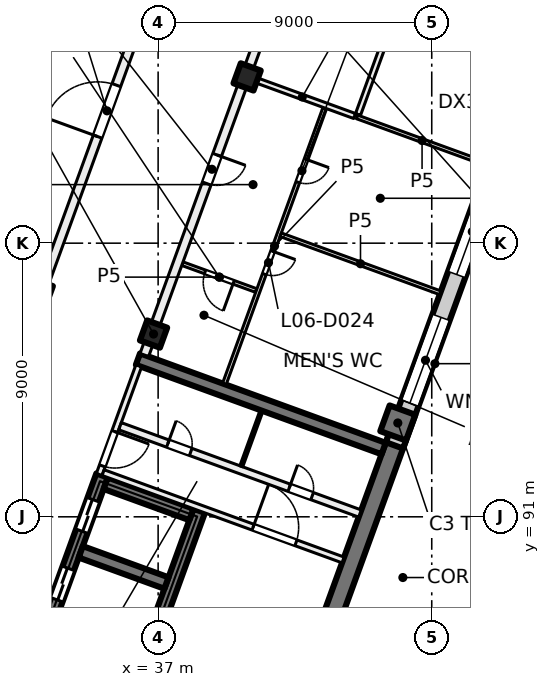
"""IFC4 building model, lengths in metres.
Left out: names, types, materials, properties, quantities, classifications, styles, units other than length and angle.
Written with IfcOpenShell. Run it as: python <this file> out.ifc"""

import sys

from ifc_helpers import new_model, si_unit, direction, frame, frame_2d, origin, origin_2d, place, context, subcontext, project, spatial, rectangle, extrude, element, fill, save


model = new_model("IFC4")
c1 = context("Model", 3, precision=1e-05, world=origin(), true_north=direction((0.0, 1.0)))
c2 = subcontext(c1, "Body", "Model", "MODEL_VIEW")
j1 = project(units=[si_unit("LENGTHUNIT", "METRE"), si_unit("PLANEANGLEUNIT", "RADIAN")], contexts=[c1])
p1 = place(None, origin())
s1 = spatial("IfcSite", under=j1, at=p1, CompositionType="ELEMENT")
p2 = place(p1, origin())
s2 = spatial("IfcBuilding", under=s1, at=p2, CompositionType="ELEMENT")
p3 = place(p2, frame((0.0, 0.0, 31.5)))
s3 = spatial("IfcBuildingStorey", under=s2, at=p3, CompositionType="ELEMENT", Elevation=31.5)
for number, where, z_axis, x_axis in (
    (1, (39.927, 105.468, 0.0), (0.0, 0.0, 1.0), (-0.342, -0.94, 0.0)),
    (2, (36.849, 97.011, 0.0), (0.0, 0.0, 1.0), (-0.342, -0.94, 0.0)),
    (3, (33.091, 98.379, 0.0), (0.0, 0.0, 1.0), (-0.342, -0.94, 0.0)),
):
    element("IfcColumn", number, at=place(p3, frame(where, z_axis=z_axis, x_axis=x_axis)), inside=s3, PredefinedType="COLUMN", context=c2, shape_type="SweptSolid", body=[
        extrude(rectangle(XDim=0.7, YDim=0.7, at=origin_2d()), origin(), (0.0, 0.0, 1.0), 4.0),
    ])
p4 = place(p3, frame((44.884, 94.087, 0.0), z_axis=(0.0, 0.0, 1.0), x_axis=(-0.342020143326, -0.939692620786, 0.0)))
e4 = element("IfcColumn", 4, at=p4, inside=s3, PredefinedType="COLUMN", context=c2, shape_type="SweptSolid", body=[
    extrude(rectangle(XDim=0.9, YDim=0.9, at=origin_2d()), origin(), (0.0, 0.0, 1.0), 4.0),
])
p5 = place(p3, frame((41.827, 85.249, 0.0), z_axis=(0.0, 0.0, 1.0), x_axis=(0.342016162452, 0.939694069696, 0.0)))
e5 = element("IfcWall", 5, at=p5, inside=s3, PredefinedType="SHEAR", context=c2, shape_type="SweptSolid", body=[
    extrude(rectangle(XDim=8.9, YDim=0.6, at=frame_2d((4.45, 0.0))), origin(), (0.0, 0.0, 1.0), 4.0),
])
p6 = place(p3, frame((30.984, 80.895, 0.0), z_axis=(0.0, 0.0, 1.0), x_axis=(0.342021021735, 0.939692301071, 0.0)))
e6 = element("IfcWall", 6, at=p6, inside=s3, PredefinedType="SHEAR", context=c2, shape_type="SweptSolid", body=[
    extrude(rectangle(XDim=12.2, YDim=0.4, at=frame_2d((6.1, 0.0))), origin(), (0.0, 0.0, 1.0), 4.0),
])
p7 = place(p6, frame((5.45, 0.0, 0.0)))
e7 = element("IfcOpeningElement", 7, at=p7, cuts=e6, PredefinedType="OPENING", context=c2, shape_type="SweptSolid", body=[
    extrude(rectangle(XDim=1.1, YDim=2.1, at=frame_2d((0.55, 1.05))), frame((0.0, 0.21, 0.0), z_axis=(0.0, -1.0, 0.0), x_axis=(1.0, 0.0, 0.0)), (0.0, 0.0, 1.0), 0.42),
])
p8 = place(p6, frame((7.85, 0.0, 0.0)))
e8 = element("IfcOpeningElement", 8, at=p8, cuts=e6, PredefinedType="OPENING", context=c2, shape_type="SweptSolid", body=[
    extrude(rectangle(XDim=1.1, YDim=2.1, at=frame_2d((0.55, 1.05))), frame((0.0, 0.21, 0.0), z_axis=(0.0, -1.0, 0.0), x_axis=(1.0, 0.0, 0.0)), (0.0, 0.0, 1.0), 0.42),
])
p9 = place(p6, frame((10.25, 0.0, 0.0)))
e9 = element("IfcOpeningElement", 9, at=p9, cuts=e6, PredefinedType="OPENING", context=c2, shape_type="SweptSolid", body=[
    extrude(rectangle(XDim=1.1, YDim=2.1, at=frame_2d((0.55, 1.05))), frame((0.0, 0.21, 0.0), z_axis=(0.0, -1.0, 0.0), x_axis=(1.0, 0.0, 0.0)), (0.0, 0.0, 1.0), 0.42),
])
p10 = place(p3, frame((34.178, 79.732, 0.0), z_axis=(0.0, 0.0, 1.0), x_axis=(0.342014590177, 0.939694641948, 0.0)))
e10 = element("IfcWall", 10, at=p10, inside=s3, PredefinedType="SHEAR", context=c2, shape_type="SweptSolid", body=[
    extrude(rectangle(XDim=12.2, YDim=0.4, at=frame_2d((6.1, 0.0))), origin(), (0.0, 0.0, 1.0), 4.0),
])
p11 = place(p3, frame((37.274, 88.822, 0.0), z_axis=(0.0, 0.0, 1.0), x_axis=(-0.939686455819, 0.342037080957, 0.0)))
e11 = element("IfcWall", 11, at=p11, inside=s3, PredefinedType="SHEAR", context=c2, shape_type="SweptSolid", body=[
    extrude(rectangle(XDim=3.0, YDim=0.4, at=frame_2d((1.5, 0.0))), origin(), (0.0, 0.0, 1.0), 4.0),
])
p12 = place(p3, frame((38.095, 91.077, 0.0), z_axis=(0.0, 0.0, 1.0), x_axis=(-0.939676934218, 0.342063238742, 0.0)))
e12 = element("IfcWall", 12, at=p12, inside=s3, PredefinedType="SHEAR", context=c2, shape_type="SweptSolid", body=[
    extrude(rectangle(XDim=3.0, YDim=0.4, at=frame_2d((1.5, 0.0))), origin(), (0.0, 0.0, 1.0), 4.0),
])
p13 = place(p3, frame((44.418, 93.245, 0.0), z_axis=(0.0, 0.0, 1.0), x_axis=(-0.93969060187, 0.342025690201, 0.0)))
e13 = element("IfcWall", 13, at=p13, inside=s3, PredefinedType="SHEAR", context=c2, shape_type="SweptSolid", body=[
    extrude(rectangle(XDim=8.6, YDim=0.4, at=frame_2d((4.3, 0.0))), origin(), (0.0, 0.0, 1.0), 4.0),
])
p14 = place(p3, frame((52.212, 113.783, 0.0), z_axis=(0.0, 0.0, 1.0), x_axis=(-0.34202521188, -0.939690775968, 0.0)))
e14 = element("IfcWall", 14, at=p14, inside=s3, PredefinedType="SOLIDWALL", context=c2, shape_type="SweptSolid", body=[
    extrude(rectangle(XDim=21.745, YDim=0.6, at=frame_2d((10.873, 0.0))), origin(), (0.0, 0.0, 1.0), 3.625),
])
p15 = place(p14, frame((3.765, 0.0, 0.9)))
e15 = element("IfcOpeningElement", 15, at=p15, cuts=e14, PredefinedType="OPENING", context=c2, shape_type="SweptSolid", body=[
    extrude(rectangle(XDim=3.0, YDim=2.4, at=frame_2d((1.5, 1.2))), frame((0.0, 0.31, 0.0), z_axis=(0.0, -1.0, 0.0), x_axis=(1.0, 0.0, 0.0)), (0.0, 0.0, 1.0), 0.62),
])
p16 = place(p14, frame((8.865, 0.0, 0.0)))
e16 = element("IfcOpeningElement", 16, at=p16, cuts=e14, PredefinedType="OPENING", context=c2, shape_type="SweptSolid", body=[
    extrude(rectangle(XDim=1.8, YDim=2.4, at=frame_2d((0.9, 1.2))), frame((0.0, 0.31, 0.0), z_axis=(0.0, -1.0, 0.0), x_axis=(1.0, 0.0, 0.0)), (0.0, 0.0, 1.0), 0.62),
])
p17 = place(p14, frame((12.765, 0.0, 0.9)))
e17 = element("IfcOpeningElement", 17, at=p17, cuts=e14, PredefinedType="OPENING", context=c2, shape_type="SweptSolid", body=[
    extrude(rectangle(XDim=3.0, YDim=2.4, at=frame_2d((1.5, 1.2))), frame((0.0, 0.31, 0.0), z_axis=(0.0, -1.0, 0.0), x_axis=(1.0, 0.0, 0.0)), (0.0, 0.0, 1.0), 0.62),
])
p18 = place(p14, frame((17.265, 0.0, 0.9)))
e18 = element("IfcOpeningElement", 18, at=p18, cuts=e14, PredefinedType="OPENING", context=c2, shape_type="SweptSolid", body=[
    extrude(rectangle(XDim=3.0, YDim=2.4, at=frame_2d((1.5, 1.2))), frame((0.0, 0.31, 0.0), z_axis=(0.0, -1.0, 0.0), x_axis=(1.0, 0.0, 0.0)), (0.0, 0.0, 1.0), 0.62),
])
p19 = place(p3, frame((24.666, 100.669, 0.0), z_axis=(0.0, 0.0, 1.0), x_axis=(0.34201964167, 0.939692803373, 0.0)))
e19 = element("IfcWall", 19, at=p19, inside=s3, PredefinedType="SOLIDWALL", context=c2, shape_type="SweptSolid", body=[
    extrude(rectangle(XDim=32.884, YDim=0.6, at=frame_2d((16.442, 0.0))), origin(), (0.0, 0.0, 1.0), 3.625),
])
p20 = place(p19, frame((1.48, 0.0, 0.9)))
e20 = element("IfcOpeningElement", 20, at=p20, cuts=e19, PredefinedType="OPENING", context=c2, shape_type="SweptSolid", body=[
    extrude(rectangle(XDim=3.0, YDim=2.4, at=frame_2d((1.5, 1.2))), frame((0.0, 0.31, 0.0), z_axis=(0.0, -1.0, 0.0), x_axis=(1.0, 0.0, 0.0)), (0.0, 0.0, 1.0), 0.62),
])
p21 = place(p19, frame((5.98, 0.0, 0.9)))
e21 = element("IfcOpeningElement", 21, at=p21, cuts=e19, PredefinedType="OPENING", context=c2, shape_type="SweptSolid", body=[
    extrude(rectangle(XDim=3.0, YDim=2.4, at=frame_2d((1.5, 1.2))), frame((0.0, 0.31, 0.0), z_axis=(0.0, -1.0, 0.0), x_axis=(1.0, 0.0, 0.0)), (0.0, 0.0, 1.0), 0.62),
])
p22 = place(p19, frame((11.08, 0.0, 0.0)))
e22 = element("IfcOpeningElement", 22, at=p22, cuts=e19, PredefinedType="OPENING", context=c2, shape_type="SweptSolid", body=[
    extrude(rectangle(XDim=1.8, YDim=2.4, at=frame_2d((0.9, 1.2))), frame((0.0, 0.31, 0.0), z_axis=(0.0, -1.0, 0.0), x_axis=(1.0, 0.0, 0.0)), (0.0, 0.0, 1.0), 0.62),
])
p23 = place(p19, frame((14.98, 0.0, 0.9)))
e23 = element("IfcOpeningElement", 23, at=p23, cuts=e19, PredefinedType="OPENING", context=c2, shape_type="SweptSolid", body=[
    extrude(rectangle(XDim=3.0, YDim=2.4, at=frame_2d((1.5, 1.2))), frame((0.0, 0.31, 0.0), z_axis=(0.0, -1.0, 0.0), x_axis=(1.0, 0.0, 0.0)), (0.0, 0.0, 1.0), 0.62),
])
p24 = place(p19, frame((19.48, 0.0, 0.9)))
e24 = element("IfcOpeningElement", 24, at=p24, cuts=e19, PredefinedType="OPENING", context=c2, shape_type="SweptSolid", body=[
    extrude(rectangle(XDim=3.0, YDim=2.4, at=frame_2d((1.5, 1.2))), frame((0.0, 0.31, 0.0), z_axis=(0.0, -1.0, 0.0), x_axis=(1.0, 0.0, 0.0)), (0.0, 0.0, 1.0), 0.62),
])
p25 = place(p19, frame((24.58, 0.0, 0.0)))
e25 = element("IfcOpeningElement", 25, at=p25, cuts=e19, PredefinedType="OPENING", context=c2, shape_type="SweptSolid", body=[
    extrude(rectangle(XDim=1.8, YDim=2.4, at=frame_2d((0.9, 1.2))), frame((0.0, 0.31, 0.0), z_axis=(0.0, -1.0, 0.0), x_axis=(1.0, 0.0, 0.0)), (0.0, 0.0, 1.0), 0.62),
])
p26 = place(p19, frame((28.48, 0.0, 0.9)))
e26 = element("IfcOpeningElement", 26, at=p26, cuts=e19, PredefinedType="OPENING", context=c2, shape_type="SweptSolid", body=[
    extrude(rectangle(XDim=3.0, YDim=2.4, at=frame_2d((1.5, 1.2))), frame((0.0, 0.31, 0.0), z_axis=(0.0, -1.0, 0.0), x_axis=(1.0, 0.0, 0.0)), (0.0, 0.0, 1.0), 0.62),
])
p27 = place(p3, frame((36.362, 95.964, 0.0), z_axis=(0.0, 0.0, 1.0), x_axis=(-0.341995824804, -0.939701471648, 0.0)))
e27 = element("IfcWall", 27, at=p27, inside=s3, PredefinedType="PARTITIONING", context=c2, shape_type="SweptSolid", body=[
    extrude(rectangle(XDim=3.8, YDim=0.2, at=frame_2d((1.9, 0.0))), origin(), (0.0, 0.0, 1.0), 3.625),
])
p28 = place(p27, frame((2.3, 0.0, 0.0)))
e28 = element("IfcOpeningElement", 28, at=p28, cuts=e27, PredefinedType="OPENING", context=c2, shape_type="SweptSolid", body=[
    extrude(rectangle(XDim=1.2, YDim=2.1, at=frame_2d((0.6, 1.05))), frame((0.0, 0.11, 0.0), z_axis=(0.0, -1.0, 0.0), x_axis=(1.0, 0.0, 0.0)), (0.0, 0.0, 1.0), 0.22),
])
p29 = place(p3, frame((35.19, 92.453, 0.0), z_axis=(0.0, 0.0, 1.0), x_axis=(0.939691552312, -0.342023078919, 0.0)))
e29 = element("IfcWall", 29, at=p29, inside=s3, PredefinedType="PARTITIONING", context=c2, shape_type="SweptSolid", body=[
    extrude(rectangle(XDim=8.4, YDim=0.2, at=frame_2d((4.2, 0.0))), origin(), (0.0, 0.0, 1.0), 3.625),
])
p30 = place(p29, frame((5.25, 0.0, 0.0)))
e30 = element("IfcOpeningElement", 30, at=p30, cuts=e29, PredefinedType="OPENING", context=c2, shape_type="SweptSolid", body=[
    extrude(rectangle(XDim=1.5, YDim=2.1, at=frame_2d((0.75, 1.05))), frame((0.0, 0.11, 0.0), z_axis=(0.0, -1.0, 0.0), x_axis=(1.0, 0.0, 0.0)), (0.0, 0.0, 1.0), 0.22),
])
p31 = place(p3, frame((35.746, 93.98, 0.0), z_axis=(0.0, 0.0, 1.0), x_axis=(0.939691552312, -0.342023078919, 0.0)))
e31 = element("IfcWall", 31, at=p31, inside=s3, PredefinedType="PARTITIONING", context=c2, shape_type="SweptSolid", body=[
    extrude(rectangle(XDim=8.4, YDim=0.25, at=frame_2d((4.2, 0.0))), origin(), (0.0, 0.0, 1.0), 3.625),
])
p32 = place(p31, frame((1.675, 0.0, 0.0)))
e32 = element("IfcOpeningElement", 32, at=p32, cuts=e31, PredefinedType="OPENING", context=c2, shape_type="SweptSolid", body=[
    extrude(rectangle(XDim=0.8, YDim=2.1, at=frame_2d((0.4, 1.05))), frame((0.0, 0.135, 0.0), z_axis=(0.0, -1.0, 0.0), x_axis=(1.0, 0.0, 0.0)), (0.0, 0.0, 1.0), 0.27),
])
p33 = place(p31, frame((5.925, 0.0, 0.0)))
e33 = element("IfcOpeningElement", 33, at=p33, cuts=e31, PredefinedType="OPENING", context=c2, shape_type="SweptSolid", body=[
    extrude(rectangle(XDim=0.8, YDim=2.1, at=frame_2d((0.4, 1.05))), frame((0.0, 0.135, 0.0), z_axis=(0.0, -1.0, 0.0), x_axis=(1.0, 0.0, 0.0)), (0.0, 0.0, 1.0), 0.27),
])
p34 = place(p3, frame((40.403, 94.494, 0.0), z_axis=(0.0, 0.0, 1.0), x_axis=(-0.342064742067, -0.939676386973, 0.0)))
e34 = element("IfcWall", 34, at=p34, inside=s3, PredefinedType="PARTITIONING", context=c2, shape_type="SweptSolid", body=[
    extrude(rectangle(XDim=1.95, YDim=0.1, at=frame_2d((0.975, 0.0))), origin(), (0.0, 0.0, 1.0), 3.625),
])
p35 = place(p3, frame((32.881, 97.657, 0.0), z_axis=(0.0, 0.0, 1.0), x_axis=(0.342017360004, 0.939693633828, 0.0)))
e35 = element("IfcWall", 35, at=p35, inside=s3, PredefinedType="PARTITIONING", context=c2, shape_type="SweptSolid", body=[
    extrude(rectangle(XDim=34.516, YDim=0.3, at=frame_2d((17.258, 0.0))), origin(), (0.0, 0.0, 1.0), 3.625),
])
p36 = place(p35, frame((6.225, 0.0, 0.0)))
e36 = element("IfcOpeningElement", 36, at=p36, cuts=e35, PredefinedType="OPENING", context=c2, shape_type="SweptSolid", body=[
    extrude(rectangle(XDim=1.8, YDim=2.1, at=frame_2d((0.9, 1.05))), frame((0.0, 0.16, 0.0), z_axis=(0.0, -1.0, 0.0), x_axis=(1.0, 0.0, 0.0)), (0.0, 0.0, 1.0), 0.32),
])
p37 = place(p35, frame((15.9, 0.0, 0.0)))
e37 = element("IfcOpeningElement", 37, at=p37, cuts=e35, PredefinedType="OPENING", context=c2, shape_type="SweptSolid", body=[
    extrude(rectangle(XDim=1.2, YDim=2.1, at=frame_2d((0.6, 1.05))), frame((0.0, 0.16, 0.0), z_axis=(0.0, -1.0, 0.0), x_axis=(1.0, 0.0, 0.0)), (0.0, 0.0, 1.0), 0.32),
])
p38 = place(p35, frame((20.5, 0.0, 0.0)))
e38 = element("IfcOpeningElement", 38, at=p38, cuts=e35, PredefinedType="OPENING", context=c2, shape_type="SweptSolid", body=[
    extrude(rectangle(XDim=1.0, YDim=2.1, at=frame_2d((0.5, 1.05))), frame((0.0, 0.16, 0.0), z_axis=(0.0, -1.0, 0.0), x_axis=(1.0, 0.0, 0.0)), (0.0, 0.0, 1.0), 0.32),
])
p39 = place(p35, frame((25.0, 0.0, 0.0)))
e39 = element("IfcOpeningElement", 39, at=p39, cuts=e35, PredefinedType="OPENING", context=c2, shape_type="SweptSolid", body=[
    extrude(rectangle(XDim=1.0, YDim=2.1, at=frame_2d((0.5, 1.05))), frame((0.0, 0.16, 0.0), z_axis=(0.0, -1.0, 0.0), x_axis=(1.0, 0.0, 0.0)), (0.0, 0.0, 1.0), 0.32),
])
p40 = place(p35, frame((30.562, 0.0, 0.0)))
e40 = element("IfcOpeningElement", 40, at=p40, cuts=e35, PredefinedType="OPENING", context=c2, shape_type="SweptSolid", body=[
    extrude(rectangle(XDim=1.0, YDim=2.1, at=frame_2d((0.5, 1.05))), frame((0.0, 0.16, 0.0), z_axis=(0.0, -1.0, 0.0), x_axis=(1.0, 0.0, 0.0)), (0.0, 0.0, 1.0), 0.32),
])
p41 = place(p3, frame((40.229, 98.441, 0.0), z_axis=(0.0, 0.0, 1.0), x_axis=(-0.939663852573, 0.342099173001, 0.0)))
e41 = element("IfcWall", 41, at=p41, inside=s3, PredefinedType="PARTITIONING", context=c2, shape_type="SweptSolid", body=[
    extrude(rectangle(XDim=2.587, YDim=0.125, at=frame_2d((1.293, 0.0))), origin(), (0.0, 0.0, 1.0), 3.625),
])
p42 = place(p41, frame((0.794, 0.0, 0.0)))
e42 = element("IfcOpeningElement", 42, at=p42, cuts=e41, PredefinedType="OPENING", context=c2, shape_type="SweptSolid", body=[
    extrude(rectangle(XDim=1.0, YDim=2.1, at=frame_2d((0.5, 1.05))), frame((0.0, 0.073, 0.0), z_axis=(0.0, -1.0, 0.0), x_axis=(1.0, 0.0, 0.0)), (0.0, 0.0, 1.0), 0.145),
])
p43 = place(p3, frame((42.482, 104.446, 0.0), z_axis=(0.0, 0.0, 1.0), x_axis=(-0.342025030348, -0.939690842041, 0.0)))
e43 = element("IfcWall", 43, at=p43, inside=s3, PredefinedType="PARTITIONING", context=c2, shape_type="SweptSolid", body=[
    extrude(rectangle(XDim=9.663, YDim=0.125, at=frame_2d((4.832, 0.0))), origin(), (0.0, 0.0, 1.0), 3.625),
])
p44 = place(p43, frame((1.797, 0.0, 0.0)))
e44 = element("IfcOpeningElement", 44, at=p44, cuts=e43, PredefinedType="OPENING", context=c2, shape_type="SweptSolid", body=[
    extrude(rectangle(XDim=0.8, YDim=2.1, at=frame_2d((0.4, 1.05))), frame((0.0, 0.073, 0.0), z_axis=(0.0, -1.0, 0.0), x_axis=(1.0, 0.0, 0.0)), (0.0, 0.0, 1.0), 0.145),
])
p45 = place(p43, frame((5.015, 0.0, 0.0)))
e45 = element("IfcOpeningElement", 45, at=p45, cuts=e43, PredefinedType="OPENING", context=c2, shape_type="SweptSolid", body=[
    extrude(rectangle(XDim=0.8, YDim=2.1, at=frame_2d((0.4, 1.05))), frame((0.0, 0.073, 0.0), z_axis=(0.0, -1.0, 0.0), x_axis=(1.0, 0.0, 0.0)), (0.0, 0.0, 1.0), 0.145),
])
p46 = place(p3, frame((40.021, 105.434, 0.0), z_axis=(0.0, 0.0, 1.0), x_axis=(0.939740864669, -0.341887565249, 0.0)))
e46 = element("IfcWall", 46, at=p46, inside=s3, PredefinedType="PARTITIONING", context=c2, shape_type="SweptSolid", body=[
    extrude(rectangle(XDim=3.663, YDim=0.175, at=frame_2d((1.831, 0.0))), origin(), (0.0, 0.0, 1.0), 3.625),
])
p47 = place(p3, frame((41.031, 100.278, 0.0), z_axis=(0.0, 0.0, 1.0), x_axis=(0.939696437289, -0.342009657388, 0.0)))
e47 = element("IfcWall", 47, at=p47, inside=s3, PredefinedType="PARTITIONING", context=c2, shape_type="SweptSolid", body=[
    extrude(rectangle(XDim=5.588, YDim=0.125, at=frame_2d((2.794, 0.0))), origin(), (0.0, 0.0, 1.0), 3.625),
])
p48 = place(p3, frame((43.542, 104.153, 0.0), z_axis=(0.0, 0.0, 1.0), x_axis=(0.939646198652, -0.34214766017, 0.0)))
e48 = element("IfcWall", 48, at=p48, inside=s3, PredefinedType="PARTITIONING", context=c2, shape_type="SweptSolid", body=[
    extrude(rectangle(XDim=4.554, YDim=0.125, at=frame_2d((2.277, 0.0))), origin(), (0.0, 0.0, 1.0), 3.625),
])
p49 = place(p3, frame((44.612, 118.483, 0.0), z_axis=(0.0, 0.0, 1.0), x_axis=(-0.342043123066, -0.939684256526, 0.0)))
e49 = element("IfcWall", 49, at=p49, inside=s3, PredefinedType="PARTITIONING", context=c2, shape_type="SweptSolid", body=[
    extrude(rectangle(XDim=23.582, YDim=0.3, at=frame_2d((11.791, 0.0))), origin(), (0.0, 0.0, 1.0), 3.625),
])
p50 = place(p49, frame((16.583, 0.0, 0.0)))
e50 = element("IfcOpeningElement", 50, at=p50, cuts=e49, PredefinedType="OPENING", context=c2, shape_type="SweptSolid", body=[
    extrude(rectangle(XDim=1.0, YDim=2.1, at=frame_2d((0.5, 1.05))), frame((0.0, 0.16, 0.0), z_axis=(0.0, -1.0, 0.0), x_axis=(1.0, 0.0, 0.0)), (0.0, 0.0, 1.0), 0.32),
])
p51 = place(p49, frame((10.982, 0.0, 0.0)))
e51 = element("IfcOpeningElement", 51, at=p51, cuts=e49, PredefinedType="OPENING", context=c2, shape_type="SweptSolid", body=[
    extrude(rectangle(XDim=1.2, YDim=2.1, at=frame_2d((0.6, 1.05))), frame((0.0, 0.16, 0.0), z_axis=(0.0, -1.0, 0.0), x_axis=(1.0, 0.0, 0.0)), (0.0, 0.0, 1.0), 0.32),
])
p52 = place(p49, frame((5.756, 0.0, 0.0)))
e52 = element("IfcOpeningElement", 52, at=p52, cuts=e49, PredefinedType="OPENING", context=c2, shape_type="SweptSolid", body=[
    extrude(rectangle(XDim=1.8, YDim=2.1, at=frame_2d((0.9, 1.05))), frame((0.0, 0.16, 0.0), z_axis=(0.0, -1.0, 0.0), x_axis=(1.0, 0.0, 0.0)), (0.0, 0.0, 1.0), 0.32),
])
p53 = place(p3, frame((45.114, 108.462, 0.0), z_axis=(0.0, 0.0, 1.0), x_axis=(-0.342056723843, -0.93967930576, 0.0)))
e53 = element("IfcWall", 53, at=p53, inside=s3, PredefinedType="PARTITIONING", context=c2, shape_type="SweptSolid", body=[
    extrude(rectangle(XDim=4.5, YDim=0.175, at=frame_2d((2.25, 0.0))), origin(), (0.0, 0.0, 1.0), 3.625),
])
p54 = place(p17, origin())
e54 = element("IfcWindow", 54, at=p54, inside=s3, PartitioningType="SINGLE_PANEL", PredefinedType="WINDOW", context=c2, shape_type="SweptSolid", body=[
    extrude(rectangle(XDim=3.0, YDim=2.4, at=frame_2d((1.5, 1.2))), frame((0.0, 0.03, 0.0), z_axis=(0.0, -1.0, 0.0), x_axis=(1.0, 0.0, 0.0)), (0.0, 0.0, 1.0), 0.06),
])
fill(e17, e54)
p55 = place(p18, origin())
e55 = element("IfcWindow", 55, at=p55, inside=s3, PartitioningType="SINGLE_PANEL", PredefinedType="WINDOW", context=c2, shape_type="SweptSolid", body=[
    extrude(rectangle(XDim=3.0, YDim=2.4, at=frame_2d((1.5, 1.2))), frame((0.0, 0.03, 0.0), z_axis=(0.0, -1.0, 0.0), x_axis=(1.0, 0.0, 0.0)), (0.0, 0.0, 1.0), 0.06),
])
fill(e18, e55)
p56 = place(p8, origin())
e56 = element("IfcDoor", 56, at=p56, inside=s3, OperationType="DOUBLE_DOOR_SLIDING", PredefinedType="DOOR", context=c2, shape_type="SweptSolid", body=[
    extrude(rectangle(XDim=1.1, YDim=2.1, at=frame_2d((0.55, 1.05))), frame((0.0, 0.025, 0.0), z_axis=(0.0, -1.0, 0.0), x_axis=(1.0, 0.0, 0.0)), (0.0, 0.0, 1.0), 0.05),
])
fill(e8, e56)
p57 = place(p9, origin())
e57 = element("IfcDoor", 57, at=p57, inside=s3, OperationType="DOUBLE_DOOR_SLIDING", PredefinedType="DOOR", context=c2, shape_type="SweptSolid", body=[
    extrude(rectangle(XDim=1.1, YDim=2.1, at=frame_2d((0.55, 1.05))), frame((0.0, 0.025, 0.0), z_axis=(0.0, -1.0, 0.0), x_axis=(1.0, 0.0, 0.0)), (0.0, 0.0, 1.0), 0.05),
])
fill(e9, e57)
p58 = place(p28, origin())
e58 = element("IfcDoor", 58, at=p58, inside=s3, OperationType="DOUBLE_DOOR_SINGLE_SWING", PredefinedType="DOOR", context=c2, shape_type="SweptSolid", body=[
    extrude(rectangle(XDim=1.2, YDim=2.1, at=frame_2d((0.6, 1.05))), frame((0.0, 0.025, 0.0), z_axis=(0.0, -1.0, 0.0), x_axis=(1.0, 0.0, 0.0)), (0.0, 0.0, 1.0), 0.05),
])
fill(e28, e58)
p59 = place(p30, origin())
e59 = element("IfcDoor", 59, at=p59, inside=s3, OperationType="DOUBLE_DOOR_SINGLE_SWING", PredefinedType="DOOR", context=c2, shape_type="SweptSolid", body=[
    extrude(rectangle(XDim=1.5, YDim=2.1, at=frame_2d((0.75, 1.05))), frame((0.0, 0.025, 0.0), z_axis=(0.0, -1.0, 0.0), x_axis=(1.0, 0.0, 0.0)), (0.0, 0.0, 1.0), 0.05),
])
fill(e30, e59)
p60 = place(p32, origin())
e60 = element("IfcDoor", 60, at=p60, inside=s3, OperationType="SINGLE_SWING_RIGHT", PredefinedType="DOOR", context=c2, shape_type="SweptSolid", body=[
    extrude(rectangle(XDim=0.8, YDim=2.1, at=frame_2d((0.4, 1.05))), frame((0.0, 0.025, 0.0), z_axis=(0.0, -1.0, 0.0), x_axis=(1.0, 0.0, 0.0)), (0.0, 0.0, 1.0), 0.05),
])
fill(e32, e60)
p61 = place(p33, origin())
e61 = element("IfcDoor", 61, at=p61, inside=s3, OperationType="SINGLE_SWING_LEFT", PredefinedType="DOOR", context=c2, shape_type="SweptSolid", body=[
    extrude(rectangle(XDim=0.8, YDim=2.1, at=frame_2d((0.4, 1.05))), frame((0.0, 0.025, 0.0), z_axis=(0.0, -1.0, 0.0), x_axis=(1.0, 0.0, 0.0)), (0.0, 0.0, 1.0), 0.05),
])
fill(e33, e61)
p62 = place(p36, origin())
e62 = element("IfcDoor", 62, at=p62, inside=s3, OperationType="DOUBLE_DOOR_SINGLE_SWING", PredefinedType="DOOR", context=c2, shape_type="SweptSolid", body=[
    extrude(rectangle(XDim=1.8, YDim=2.1, at=frame_2d((0.9, 1.05))), frame((0.0, 0.025, 0.0), z_axis=(0.0, -1.0, 0.0), x_axis=(1.0, 0.0, 0.0)), (0.0, 0.0, 1.0), 0.05),
])
fill(e36, e62)
p63 = place(p50, origin())
e63 = element("IfcDoor", 63, at=p63, inside=s3, OperationType="SINGLE_SWING_LEFT", PredefinedType="DOOR", context=c2, shape_type="SweptSolid", body=[
    extrude(rectangle(XDim=1.0, YDim=2.1, at=frame_2d((0.5, 1.05))), frame((0.0, 0.025, 0.0), z_axis=(0.0, -1.0, 0.0), x_axis=(1.0, 0.0, 0.0)), (0.0, 0.0, 1.0), 0.05),
])
fill(e50, e63)
p64 = place(p42, origin())
e64 = element("IfcDoor", 64, at=p64, inside=s3, OperationType="SINGLE_SWING_RIGHT", PredefinedType="DOOR", context=c2, shape_type="SweptSolid", body=[
    extrude(rectangle(XDim=1.0, YDim=2.1, at=frame_2d((0.5, 1.05))), frame((0.0, 0.025, 0.0), z_axis=(0.0, -1.0, 0.0), x_axis=(1.0, 0.0, 0.0)), (0.0, 0.0, 1.0), 0.05),
])
fill(e42, e64)
p65 = place(p44, origin())
e65 = element("IfcDoor", 65, at=p65, inside=s3, OperationType="SINGLE_SWING_RIGHT", PredefinedType="DOOR", context=c2, shape_type="SweptSolid", body=[
    extrude(rectangle(XDim=0.8, YDim=2.1, at=frame_2d((0.4, 1.05))), frame((0.0, 0.025, 0.0), z_axis=(0.0, -1.0, 0.0), x_axis=(1.0, 0.0, 0.0)), (0.0, 0.0, 1.0), 0.05),
])
fill(e44, e65)
p66 = place(p45, origin())
e66 = element("IfcDoor", 66, at=p66, inside=s3, OperationType="SINGLE_SWING_LEFT", PredefinedType="DOOR", context=c2, shape_type="SweptSolid", body=[
    extrude(rectangle(XDim=0.8, YDim=2.1, at=frame_2d((0.4, 1.05))), frame((0.0, 0.025, 0.0), z_axis=(0.0, -1.0, 0.0), x_axis=(1.0, 0.0, 0.0)), (0.0, 0.0, 1.0), 0.05),
])
fill(e45, e66)
save(model, sys.argv[1])
